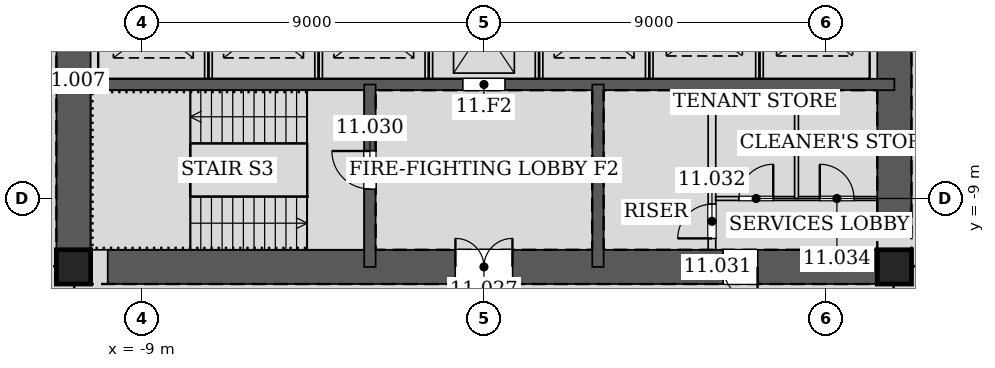
"""IFC4 building model, lengths in metres.
Left out: names, types, materials, properties, quantities, classifications, styles, units other than length and angle.
Written with IfcOpenShell. Run it as: python <this file> out.ifc"""

import sys

from ifc_helpers import new_model, si_unit, direction, frame, frame_2d, origin, origin_2d, place, context, subcontext, project, spatial, rectangle, hollow_rectangle, extrude, element, fill, save


model = new_model("IFC4")
c1 = context("Model", 3, precision=1e-05, world=origin(), true_north=direction((0.0, 1.0)))
c2 = subcontext(c1, "Body", "Model", "MODEL_VIEW")
j1 = project(units=[si_unit("LENGTHUNIT", "METRE"), si_unit("PLANEANGLEUNIT", "RADIAN")], contexts=[c1])
p1 = place(None, origin())
s1 = spatial("IfcSite", under=j1, at=p1, CompositionType="ELEMENT")
p2 = place(p1, origin())
s2 = spatial("IfcBuilding", under=s1, at=p2, CompositionType="ELEMENT")
p3 = place(p2, frame((0.0, 0.0, 54.0)))
s3 = spatial("IfcBuildingStorey", under=s2, at=p3, CompositionType="ELEMENT", Elevation=54.0)
for number, where, z_axis, x_axis in (
    (1, (-10.8, -10.8, 0.0), (0.0, 0.0, 1.0), (1.0, 0.0, 0.0)),
    (2, (10.8, -10.8, 0.0), (0.0, 0.0, 1.0), (1.0, 0.0, 0.0)),
):
    element("IfcColumn", number, at=place(p3, frame(where, z_axis=z_axis, x_axis=x_axis)), inside=s3, PredefinedType="COLUMN", context=c2, shape_type="SweptSolid", body=[
        extrude(hollow_rectangle(XDim=0.9, YDim=0.9, WallThickness=0.06, at=origin_2d()), origin(), (0.0, 0.0, 1.0), 4.2),
    ])
p4 = place(p3, frame((-10.8, -10.8, 0.0), z_axis=(0.0, 0.0, 1.0), x_axis=(1.0, 0.0, 0.0)))
e3 = element("IfcWall", 3, at=p4, inside=s3, PredefinedType="SOLIDWALL", context=c2, shape_type="SweptSolid", body=[
    extrude(rectangle(XDim=21.6, YDim=0.9, at=frame_2d((10.8, 0.0))), origin(), (0.0, 0.0, 1.0), 4.2),
])
p5 = place(p4, frame((10.05, 0.0, 0.0)))
e4 = element("IfcOpeningElement", 4, at=p5, cuts=e3, PredefinedType="OPENING", context=c2, shape_type="SweptSolid", body=[
    extrude(rectangle(XDim=1.5, YDim=2.1, at=frame_2d((0.75, 1.05))), frame((0.0, 0.46, 0.0), z_axis=(0.0, -1.0, 0.0), x_axis=(1.0, 0.0, 0.0)), (0.0, 0.0, 1.0), 0.92),
])
p6 = place(p4, frame((17.1, 0.0, 0.0)))
e5 = element("IfcOpeningElement", 5, at=p6, cuts=e3, PredefinedType="OPENING", context=c2, shape_type="SweptSolid", body=[
    extrude(rectangle(XDim=0.9, YDim=2.1, at=frame_2d((0.45, 1.05))), frame((0.0, 0.46, 0.0), z_axis=(0.0, -1.0, 0.0), x_axis=(1.0, 0.0, 0.0)), (0.0, 0.0, 1.0), 0.92),
])
p7 = place(p3, frame((10.8, -10.8, 0.0), z_axis=(0.0, 0.0, 1.0), x_axis=(0.0, 1.0, 0.0)))
e6 = element("IfcWall", 6, at=p7, inside=s3, PredefinedType="SOLIDWALL", context=c2, shape_type="SweptSolid", body=[
    extrude(rectangle(XDim=21.6, YDim=0.9, at=frame_2d((10.8, 0.0))), origin(), (0.0, 0.0, 1.0), 4.2),
])
p8 = place(p7, frame((11.7, 0.0, 0.0)))
e7 = element("IfcOpeningElement", 7, at=p8, cuts=e6, PredefinedType="OPENING", context=c2, shape_type="SweptSolid", body=[
    extrude(rectangle(XDim=1.2, YDim=2.1, at=frame_2d((0.6, 1.05))), frame((0.0, 0.46, 0.0), z_axis=(0.0, -1.0, 0.0), x_axis=(1.0, 0.0, 0.0)), (0.0, 0.0, 1.0), 0.92),
])
p9 = place(p7, frame((8.7, 0.0, 0.0)))
e8 = element("IfcOpeningElement", 8, at=p9, cuts=e6, PredefinedType="OPENING", context=c2, shape_type="SweptSolid", body=[
    extrude(rectangle(XDim=1.2, YDim=2.1, at=frame_2d((0.6, 1.05))), frame((0.0, 0.46, 0.0), z_axis=(0.0, -1.0, 0.0), x_axis=(1.0, 0.0, 0.0)), (0.0, 0.0, 1.0), 0.92),
])
p10 = place(p3, frame((-10.8, 10.8, 0.0), z_axis=(0.0, 0.0, 1.0), x_axis=(0.0, -1.0, 0.0)))
e9 = element("IfcWall", 9, at=p10, inside=s3, PredefinedType="SOLIDWALL", context=c2, shape_type="SweptSolid", body=[
    extrude(rectangle(XDim=21.6, YDim=0.9, at=frame_2d((10.8, 0.0))), origin(), (0.0, 0.0, 1.0), 4.2),
])
p11 = place(p10, frame((8.7, 0.0, 0.0)))
e10 = element("IfcOpeningElement", 10, at=p11, cuts=e9, PredefinedType="OPENING", context=c2, shape_type="SweptSolid", body=[
    extrude(rectangle(XDim=1.2, YDim=2.1, at=frame_2d((0.6, 1.05))), frame((0.0, 0.46, 0.0), z_axis=(0.0, -1.0, 0.0), x_axis=(1.0, 0.0, 0.0)), (0.0, 0.0, 1.0), 0.92),
])
p12 = place(p10, frame((11.7, 0.0, 0.0)))
e11 = element("IfcOpeningElement", 11, at=p12, cuts=e9, PredefinedType="OPENING", context=c2, shape_type="SweptSolid", body=[
    extrude(rectangle(XDim=1.2, YDim=2.1, at=frame_2d((0.6, 1.05))), frame((0.0, 0.46, 0.0), z_axis=(0.0, -1.0, 0.0), x_axis=(1.0, 0.0, 0.0)), (0.0, 0.0, 1.0), 0.92),
])
p13 = place(p3, frame((-10.8, -6.0, 0.0), z_axis=(0.0, 0.0, 1.0), x_axis=(1.0, 0.0, 0.0)))
e12 = element("IfcWall", 12, at=p13, inside=s3, PredefinedType="SOLIDWALL", context=c2, shape_type="SweptSolid", body=[
    extrude(rectangle(XDim=21.6, YDim=0.3, at=frame_2d((10.8, 0.0))), origin(), (0.0, 0.0, 1.0), 4.2),
])
p14 = place(p13, frame((10.25, 0.0, 0.0)))
e13 = element("IfcOpeningElement", 13, at=p14, cuts=e12, PredefinedType="OPENING", context=c2, shape_type="SweptSolid", body=[
    extrude(rectangle(XDim=1.1, YDim=2.1, at=frame_2d((0.55, 1.05))), frame((0.0, 0.16, 0.0), z_axis=(0.0, -1.0, 0.0), x_axis=(1.0, 0.0, 0.0)), (0.0, 0.0, 1.0), 0.32),
])
p15 = place(p3, frame((-3.0, -6.0, 0.0), z_axis=(0.0, 0.0, 1.0), x_axis=(0.0, -1.0, 0.0)))
e14 = element("IfcWall", 14, at=p15, inside=s3, PredefinedType="SOLIDWALL", context=c2, shape_type="SweptSolid", body=[
    extrude(rectangle(XDim=4.8, YDim=0.3, at=frame_2d((2.4, 0.0))), origin(), (0.0, 0.0, 1.0), 4.2),
])
p16 = place(p15, frame((1.75, 0.0, 0.0)))
e15 = element("IfcOpeningElement", 15, at=p16, cuts=e14, PredefinedType="OPENING", context=c2, shape_type="SweptSolid", body=[
    extrude(rectangle(XDim=1.0, YDim=2.1, at=frame_2d((0.5, 1.05))), frame((0.0, 0.16, 0.0), z_axis=(0.0, -1.0, 0.0), x_axis=(1.0, 0.0, 0.0)), (0.0, 0.0, 1.0), 0.32),
])
p17 = place(p3, frame((3.0, -6.0, 0.0), z_axis=(0.0, 0.0, 1.0), x_axis=(0.0, -1.0, 0.0)))
e16 = element("IfcWall", 16, at=p17, inside=s3, PredefinedType="SOLIDWALL", context=c2, shape_type="SweptSolid", body=[
    extrude(rectangle(XDim=4.8, YDim=0.3, at=frame_2d((2.4, 0.0))), origin(), (0.0, 0.0, 1.0), 4.2),
])
for number, where, z_axis, x_axis in (
    (17, (-7.25, -5.85, 0.0), (0.0, 0.0, 1.0), (0.0, 1.0, 0.0)),
    (18, (-4.35, -5.85, 0.0), (0.0, 0.0, 1.0), (0.0, 1.0, 0.0)),
    (19, (-1.45, -5.85, 0.0), (0.0, 0.0, 1.0), (0.0, 1.0, 0.0)),
    (20, (1.45, -5.85, 0.0), (0.0, 0.0, 1.0), (0.0, 1.0, 0.0)),
    (21, (4.35, -5.85, 0.0), (0.0, 0.0, 1.0), (0.0, 1.0, 0.0)),
    (22, (7.25, -5.85, 0.0), (0.0, 0.0, 1.0), (0.0, 1.0, 0.0)),
):
    element("IfcWall", number, at=place(p3, frame(where, z_axis=z_axis, x_axis=x_axis)), inside=s3, PredefinedType="PARTITIONING", context=c2, shape_type="SweptSolid", body=[
        extrude(rectangle(XDim=2.7, YDim=0.2, at=frame_2d((1.35, 0.0))), origin(), (0.0, 0.0, 1.0), 4.2),
    ])
p18 = place(p3, frame((6.0, -10.35, 0.0), z_axis=(0.0, 0.0, 1.0), x_axis=(0.0, 1.0, 0.0)))
e23 = element("IfcWall", 23, at=p18, inside=s3, PredefinedType="PARTITIONING", context=c2, shape_type="SweptSolid", body=[
    extrude(rectangle(XDim=4.2, YDim=0.2, at=frame_2d((2.1, 0.0))), origin(), (0.0, 0.0, 1.0), 4.035),
])
p19 = place(p18, frame((0.3, 0.0, 0.0)))
e24 = element("IfcOpeningElement", 24, at=p19, cuts=e23, PredefinedType="OPENING", context=c2, shape_type="SweptSolid", body=[
    extrude(rectangle(XDim=0.9, YDim=2.1, at=frame_2d((0.45, 1.05))), frame((0.0, 0.11, 0.0), z_axis=(0.0, -1.0, 0.0), x_axis=(1.0, 0.0, 0.0)), (0.0, 0.0, 1.0), 0.22),
])
p20 = place(p3, frame((6.1, -9.0, 0.0), z_axis=(0.0, 0.0, 1.0), x_axis=(1.0, 0.0, 0.0)))
e25 = element("IfcWall", 25, at=p20, inside=s3, PredefinedType="PARTITIONING", context=c2, shape_type="SweptSolid", body=[
    extrude(rectangle(XDim=4.25, YDim=0.1, at=frame_2d((2.125, 0.0))), origin(), (0.0, 0.0, 1.0), 4.035),
])
p21 = place(p20, frame((0.613, 0.0, 0.0)))
e26 = element("IfcOpeningElement", 26, at=p21, cuts=e25, PredefinedType="OPENING", context=c2, shape_type="SweptSolid", body=[
    extrude(rectangle(XDim=0.9, YDim=2.1, at=frame_2d((0.45, 1.05))), frame((0.0, 0.06, 0.0), z_axis=(0.0, -1.0, 0.0), x_axis=(1.0, 0.0, 0.0)), (0.0, 0.0, 1.0), 0.12),
])
p22 = place(p20, frame((2.738, 0.0, 0.0)))
e27 = element("IfcOpeningElement", 27, at=p22, cuts=e25, PredefinedType="OPENING", context=c2, shape_type="SweptSolid", body=[
    extrude(rectangle(XDim=0.9, YDim=2.1, at=frame_2d((0.45, 1.05))), frame((0.0, 0.06, 0.0), z_axis=(0.0, -1.0, 0.0), x_axis=(1.0, 0.0, 0.0)), (0.0, 0.0, 1.0), 0.12),
])
p23 = place(p3, frame((8.225, -9.0, 0.0), z_axis=(0.0, 0.0, 1.0), x_axis=(0.0, 1.0, 0.0)))
e28 = element("IfcWall", 28, at=p23, inside=s3, PredefinedType="PARTITIONING", context=c2, shape_type="SweptSolid", body=[
    extrude(rectangle(XDim=2.85, YDim=0.1, at=frame_2d((1.425, 0.0))), origin(), (0.0, 0.0, 1.0), 4.035),
])
p24 = place(p5, origin())
e29 = element("IfcDoor", 29, at=p24, inside=s3, OperationType="DOUBLE_DOOR_SINGLE_SWING", PredefinedType="DOOR", context=c2, shape_type="SweptSolid", body=[
    extrude(rectangle(XDim=1.5, YDim=2.1, at=frame_2d((0.75, 1.05))), frame((0.0, 0.025, 0.0), z_axis=(0.0, -1.0, 0.0), x_axis=(1.0, 0.0, 0.0)), (0.0, 0.0, 1.0), 0.05),
])
fill(e4, e29)
p25 = place(p16, frame((1.0, 0.0, 0.0), z_axis=(0.0, 0.0, 1.0), x_axis=(-1.0, 0.0, 0.0)))
e30 = element("IfcDoor", 30, at=p25, inside=s3, OperationType="SINGLE_SWING_RIGHT", PredefinedType="DOOR", context=c2, shape_type="SweptSolid", body=[
    extrude(rectangle(XDim=1.0, YDim=2.1, at=frame_2d((0.5, 1.05))), frame((0.0, 0.025, 0.0), z_axis=(0.0, -1.0, 0.0), x_axis=(1.0, 0.0, 0.0)), (0.0, 0.0, 1.0), 0.05),
])
fill(e15, e30)
p26 = place(p6, frame((0.9, 0.0, 0.0), z_axis=(0.0, 0.0, 1.0), x_axis=(-1.0, 0.0, 0.0)))
e31 = element("IfcDoor", 31, at=p26, inside=s3, OperationType="SINGLE_SWING_LEFT", PredefinedType="DOOR", context=c2, shape_type="SweptSolid", body=[
    extrude(rectangle(XDim=0.9, YDim=2.1, at=frame_2d((0.45, 1.05))), frame((0.0, 0.025, 0.0), z_axis=(0.0, -1.0, 0.0), x_axis=(1.0, 0.0, 0.0)), (0.0, 0.0, 1.0), 0.05),
])
fill(e5, e31)
p27 = place(p19, origin())
e32 = element("IfcDoor", 32, at=p27, inside=s3, OperationType="SINGLE_SWING_LEFT", PredefinedType="DOOR", context=c2, shape_type="SweptSolid", body=[
    extrude(rectangle(XDim=0.9, YDim=2.1, at=frame_2d((0.45, 1.05))), frame((0.0, 0.025, 0.0), z_axis=(0.0, -1.0, 0.0), x_axis=(1.0, 0.0, 0.0)), (0.0, 0.0, 1.0), 0.05),
])
fill(e24, e32)
p28 = place(p21, origin())
e33 = element("IfcDoor", 33, at=p28, inside=s3, OperationType="SINGLE_SWING_RIGHT", PredefinedType="DOOR", context=c2, shape_type="SweptSolid", body=[
    extrude(rectangle(XDim=0.9, YDim=2.1, at=frame_2d((0.45, 1.05))), frame((0.0, 0.025, 0.0), z_axis=(0.0, -1.0, 0.0), x_axis=(1.0, 0.0, 0.0)), (0.0, 0.0, 1.0), 0.05),
])
fill(e26, e33)
p29 = place(p22, origin())
e34 = element("IfcDoor", 34, at=p29, inside=s3, OperationType="SINGLE_SWING_LEFT", PredefinedType="DOOR", context=c2, shape_type="SweptSolid", body=[
    extrude(rectangle(XDim=0.9, YDim=2.1, at=frame_2d((0.45, 1.05))), frame((0.0, 0.025, 0.0), z_axis=(0.0, -1.0, 0.0), x_axis=(1.0, 0.0, 0.0)), (0.0, 0.0, 1.0), 0.05),
])
fill(e27, e34)
p30 = place(p14, origin())
e35 = element("IfcDoor", 35, at=p30, inside=s3, OperationType="DOUBLE_DOOR_SLIDING", PredefinedType="DOOR", context=c2, shape_type="SweptSolid", body=[
    extrude(rectangle(XDim=1.1, YDim=2.1, at=frame_2d((0.55, 1.05))), frame((0.0, 0.025, 0.0), z_axis=(0.0, -1.0, 0.0), x_axis=(1.0, 0.0, 0.0)), (0.0, 0.0, 1.0), 0.05),
])
fill(e13, e35)
save(model, sys.argv[1])
